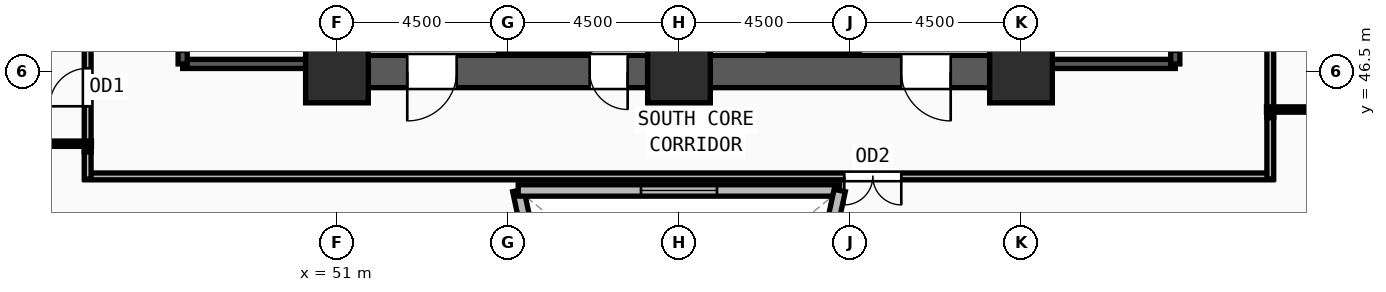
"""IFC4 building model, lengths in metres.
Left out: names, types, materials, properties, quantities, classifications, styles, units other than length and angle.
Written with IfcOpenShell. Run it as: python <this file> out.ifc"""

import sys

from ifc_helpers import new_model, si_unit, direction, frame, frame_2d, origin, origin_2d, place, context, subcontext, project, spatial, rectangle, extrude, source, transform, mapped, element, fill, save


model = new_model("IFC4")
c1 = context("Model", 3, precision=1e-05, world=origin(), true_north=direction((0.0, 1.0)))
c2 = subcontext(c1, "Body", "Model", "MODEL_VIEW")
j1 = project(units=[si_unit("LENGTHUNIT", "METRE"), si_unit("PLANEANGLEUNIT", "RADIAN")], contexts=[c1])
p1 = place(None, origin())
s1 = spatial("IfcSite", under=j1, at=p1, CompositionType="ELEMENT")
p2 = place(p1, origin())
s2 = spatial("IfcBuilding", under=s1, at=p2, CompositionType="ELEMENT")
p3 = place(p2, frame((0.0, 0.0, 85.5)))
s3 = spatial("IfcBuildingStorey", under=s2, at=p3, CompositionType="ELEMENT", Elevation=85.5)
m1 = source(origin(), c2, "Body", "SweptSolid", [
    extrude(rectangle(XDim=1.65, YDim=1.65, at=origin_2d()), origin(), (0.0, 0.0, 1.0), 3.75),
])
for number, where, z_axis, x_axis in (
    (1, (51.0, 46.5, 0.0), (0.0, 0.0, 1.0), (1.0, 0.0, 0.0)),
    (2, (60.0, 46.5, 0.0), (0.0, 0.0, 1.0), (1.0, 0.0, 0.0)),
    (3, (69.0, 46.5, 0.0), (0.0, 0.0, 1.0), (1.0, 0.0, 0.0)),
):
    element("IfcColumn", number, at=place(p3, frame(where, z_axis=z_axis, x_axis=x_axis)), inside=s3, PredefinedType="COLUMN", context=c2, shape_type="MappedRepresentation", body=[
        mapped(m1, transform((0.0, 0.0, 0.0), x_axis=(1.0, 0.0, 0.0), y_axis=(0.0, 1.0, 0.0), z_axis=(0.0, 0.0, 1.0), scale=1.0)),
    ])
p4 = place(p3, frame((68.175, 46.5, 0.0), z_axis=(0.0, 0.0, 1.0), x_axis=(-1.0, 0.0, 0.0)))
e4 = element("IfcWall", 4, at=p4, inside=s3, PredefinedType="SHEAR", context=c2, shape_type="SweptSolid", body=[
    extrude(rectangle(XDim=7.35, YDim=0.85, at=frame_2d((3.675, 0.0))), origin(), (0.0, 0.0, 1.0), 3.57),
])
m2 = source(origin(), c2, "Body", "SweptSolid", [
    extrude(rectangle(XDim=1.3, YDim=2.2, at=frame_2d((0.65, 1.1))), frame((0.0, 0.435, 0.0), z_axis=(0.0, -1.0, 0.0), x_axis=(1.0, 0.0, 0.0)), (0.0, 0.0, 1.0), 0.87),
])
p5 = place(p4, frame((1.025, 0.0, 0.0)))
e5 = element("IfcOpeningElement", 5, at=p5, cuts=e4, PredefinedType="OPENING", context=c2, shape_type="MappedRepresentation", body=[
    mapped(m2, transform((0.0, 0.0, 0.0), x_axis=(1.0, 0.0, 0.0), y_axis=(0.0, 1.0, 0.0), z_axis=(0.0, 0.0, 1.0), scale=1.0)),
])
p6 = place(p3, frame((59.175, 46.5, 0.0), z_axis=(0.0, 0.0, 1.0), x_axis=(-1.0, 0.0, 0.0)))
e6 = element("IfcWall", 6, at=p6, inside=s3, PredefinedType="SHEAR", context=c2, shape_type="SweptSolid", body=[
    extrude(rectangle(XDim=7.35, YDim=0.85, at=frame_2d((3.675, 0.0))), origin(), (0.0, 0.0, 1.0), 3.57),
])
p7 = place(p6, frame((5.025, 0.0, 0.0)))
e7 = element("IfcOpeningElement", 7, at=p7, cuts=e6, PredefinedType="OPENING", context=c2, shape_type="MappedRepresentation", body=[
    mapped(m2, transform((0.0, 0.0, 0.0), x_axis=(1.0, 0.0, 0.0), y_axis=(0.0, 1.0, 0.0), z_axis=(0.0, 0.0, 1.0), scale=1.0)),
])
m3 = source(origin(), c2, "Body", "SweptSolid", [
    extrude(rectangle(XDim=1.0, YDim=2.2, at=frame_2d((0.5, 1.1))), frame((0.0, 0.435, 0.0), z_axis=(0.0, -1.0, 0.0), x_axis=(1.0, 0.0, 0.0)), (0.0, 0.0, 1.0), 0.87),
])
p8 = place(p6, frame((0.525, 0.0, 0.0)))
e8 = element("IfcOpeningElement", 8, at=p8, cuts=e6, PredefinedType="OPENING", context=c2, shape_type="MappedRepresentation", body=[
    mapped(m3, transform((0.0, 0.0, 0.0), x_axis=(1.0, 0.0, 0.0), y_axis=(0.0, 1.0, 0.0), z_axis=(0.0, 0.0, 1.0), scale=1.0)),
])
p9 = place(p3, frame((46.94, 46.7, 0.0), z_axis=(0.0, 0.0, 1.0), x_axis=(1.0, 0.0, 0.0)))
e9 = element("IfcWall", 9, at=p9, inside=s3, PredefinedType="SOLIDWALL", context=c2, shape_type="SweptSolid", body=[
    extrude(rectangle(XDim=3.44, YDim=0.24, at=frame_2d((1.72, 0.0))), origin(), (0.0, 0.0, 1.0), 3.57),
])
p10 = place(p3, frame((50.38, 46.7, 0.0), z_axis=(0.0, 0.0, 1.0), x_axis=(0.0, 1.0, 0.0)))
e10 = element("IfcWall", 10, at=p10, inside=s3, PredefinedType="SOLIDWALL", context=c2, shape_type="SweptSolid", body=[
    extrude(rectangle(XDim=7.82, YDim=0.24, at=frame_2d((3.91, 0.0))), origin(), (0.0, 0.0, 1.0), 3.57),
])
p11 = place(p3, frame((46.94, 54.52, 0.0), z_axis=(0.0, 0.0, 1.0), x_axis=(0.0, -1.0, 0.0)))
e11 = element("IfcWall", 11, at=p11, inside=s3, PredefinedType="SOLIDWALL", context=c2, shape_type="SweptSolid", body=[
    extrude(rectangle(XDim=7.82, YDim=0.24, at=frame_2d((3.91, 0.0))), origin(), (0.0, 0.0, 1.0), 3.57),
])
m4 = source(origin(), c2, "Body", "SweptSolid", [
    extrude(rectangle(XDim=1.2, YDim=2.2, at=frame_2d((0.6, 1.1))), frame((0.0, 0.13, 0.0), z_axis=(0.0, -1.0, 0.0), x_axis=(1.0, 0.0, 0.0)), (0.0, 0.0, 1.0), 0.26),
])
p12 = place(p11, frame((6.3, 0.0, 0.0)))
e12 = element("IfcOpeningElement", 12, at=p12, cuts=e11, PredefinedType="OPENING", context=c2, shape_type="MappedRepresentation", body=[
    mapped(m4, transform((0.0, 0.0, 0.0), x_axis=(1.0, 0.0, 0.0), y_axis=(0.0, 1.0, 0.0), z_axis=(0.0, 0.0, 1.0), scale=1.0)),
])
p13 = place(p3, frame((69.62, 46.7, 0.0), z_axis=(0.0, 0.0, 1.0), x_axis=(1.0, 0.0, 0.0)))
e13 = element("IfcWall", 13, at=p13, inside=s3, PredefinedType="SOLIDWALL", context=c2, shape_type="SweptSolid", body=[
    extrude(rectangle(XDim=3.44, YDim=0.24, at=frame_2d((1.72, 0.0))), origin(), (0.0, 0.0, 1.0), 3.57),
])
p14 = place(p3, frame((73.06, 46.7, 0.0), z_axis=(0.0, 0.0, 1.0), x_axis=(0.0, 1.0, 0.0)))
e14 = element("IfcWall", 14, at=p14, inside=s3, PredefinedType="SOLIDWALL", context=c2, shape_type="SweptSolid", body=[
    extrude(rectangle(XDim=7.82, YDim=0.24, at=frame_2d((3.91, 0.0))), origin(), (0.0, 0.0, 1.0), 3.57),
])
p15 = place(p14, frame((0.32, 0.0, 0.0)))
e15 = element("IfcOpeningElement", 15, at=p15, cuts=e14, PredefinedType="OPENING", context=c2, shape_type="MappedRepresentation", body=[
    mapped(m4, transform((0.0, 0.0, 0.0), x_axis=(1.0, 0.0, 0.0), y_axis=(0.0, 1.0, 0.0), z_axis=(0.0, 0.0, 1.0), scale=1.0)),
])
p16 = place(p3, frame((69.62, 54.52, 0.0), z_axis=(0.0, 0.0, 1.0), x_axis=(0.0, -1.0, 0.0)))
e16 = element("IfcWall", 16, at=p16, inside=s3, PredefinedType="SOLIDWALL", context=c2, shape_type="SweptSolid", body=[
    extrude(rectangle(XDim=7.82, YDim=0.24, at=frame_2d((3.91, 0.0))), origin(), (0.0, 0.0, 1.0), 3.57),
])
p17 = place(p3, frame((57.251, 36.522, 0.0), z_axis=(0.0, 0.0, 1.0), x_axis=(-0.211370579765, 0.977405994462, 0.0)))
e17 = element("IfcWall", 17, at=p17, inside=s3, PredefinedType="SOLIDWALL", context=c2, shape_type="SweptSolid", body=[
    extrude(rectangle(XDim=7.006, YDim=0.3, at=frame_2d((3.503, 0.0))), origin(), (0.0, 0.0, 1.0), 3.57),
])
m5 = source(origin(), c2, "Body", "SweptSolid", [
    extrude(rectangle(XDim=2.0, YDim=1.9, at=frame_2d((1.0, 0.95))), frame((0.0, 0.16, 0.0), z_axis=(0.0, -1.0, 0.0), x_axis=(1.0, 0.0, 0.0)), (0.0, 0.0, 1.0), 0.32),
])
p18 = place(p17, frame((2.503, 0.0, 0.55)))
e18 = element("IfcOpeningElement", 18, at=p18, cuts=e17, PredefinedType="OPENING", context=c2, shape_type="MappedRepresentation", body=[
    mapped(m5, transform((0.0, 0.0, 0.0), x_axis=(1.0, 0.0, 0.0), y_axis=(0.0, 1.0, 0.0), z_axis=(0.0, 0.0, 1.0), scale=1.0)),
])
p19 = place(p3, frame((55.77, 43.37, 0.0), z_axis=(0.0, 0.0, 1.0), x_axis=(1.0, 0.0, 0.0)))
e19 = element("IfcWall", 19, at=p19, inside=s3, PredefinedType="SOLIDWALL", context=c2, shape_type="SweptSolid", body=[
    extrude(rectangle(XDim=8.46, YDim=0.3, at=frame_2d((4.23, 0.0))), origin(), (0.0, 0.0, 1.0), 3.57),
])
p20 = place(p19, frame((3.23, 0.0, 0.55)))
e20 = element("IfcOpeningElement", 20, at=p20, cuts=e19, PredefinedType="OPENING", context=c2, shape_type="MappedRepresentation", body=[
    mapped(m5, transform((0.0, 0.0, 0.0), x_axis=(1.0, 0.0, 0.0), y_axis=(0.0, 1.0, 0.0), z_axis=(0.0, 0.0, 1.0), scale=1.0)),
])
p21 = place(p3, frame((64.23, 43.37, 0.0), z_axis=(0.0, 0.0, 1.0), x_axis=(-0.211370579765, -0.977405994462, 0.0)))
e21 = element("IfcWall", 21, at=p21, inside=s3, PredefinedType="SOLIDWALL", context=c2, shape_type="SweptSolid", body=[
    extrude(rectangle(XDim=7.006, YDim=0.3, at=frame_2d((3.503, 0.0))), origin(), (0.0, 0.0, 1.0), 3.57),
])
p22 = place(p21, frame((2.503, 0.0, 0.55)))
e22 = element("IfcOpeningElement", 22, at=p22, cuts=e21, PredefinedType="OPENING", context=c2, shape_type="MappedRepresentation", body=[
    mapped(m5, transform((0.0, 0.0, 0.0), x_axis=(1.0, 0.0, 0.0), y_axis=(0.0, 1.0, 0.0), z_axis=(0.0, 0.0, 1.0), scale=1.0)),
])
p23 = place(p3, frame((44.44, 44.385, 0.0), z_axis=(0.0, 0.0, 1.0), x_axis=(0.0, 1.0, 0.0)))
e23 = element("IfcWall", 23, at=p23, inside=s3, PredefinedType="PARTITIONING", context=c2, shape_type="SweptSolid", body=[
    extrude(rectangle(XDim=3.4, YDim=0.18, at=frame_2d((1.7, 0.0))), origin(), (0.0, 0.0, 1.0), 3.57),
])
m6 = source(origin(), c2, "Body", "SweptSolid", [
    extrude(rectangle(XDim=1.0, YDim=2.2, at=frame_2d((0.5, 1.1))), frame((0.0, 0.1, 0.0), z_axis=(0.0, -1.0, 0.0), x_axis=(1.0, 0.0, 0.0)), (0.0, 0.0, 1.0), 0.2),
])
p24 = place(p23, frame((1.2, 0.0, 0.0)))
e24 = element("IfcOpeningElement", 24, at=p24, cuts=e23, PredefinedType="OPENING", context=c2, shape_type="MappedRepresentation", body=[
    mapped(m6, transform((0.0, 0.0, 0.0), x_axis=(1.0, 0.0, 0.0), y_axis=(0.0, 1.0, 0.0), z_axis=(0.0, 0.0, 1.0), scale=1.0)),
])
p25 = place(p3, frame((75.63, 43.74, 0.0), z_axis=(0.0, 0.0, 1.0), x_axis=(-1.0, 0.0, 0.0)))
e25 = element("IfcWall", 25, at=p25, inside=s3, PredefinedType="PARTITIONING", context=c2, shape_type="SweptSolid", body=[
    extrude(rectangle(XDim=31.26, YDim=0.18, at=frame_2d((15.63, 0.0))), origin(), (0.0, 0.0, 1.0), 3.57),
])
m7 = source(origin(), c2, "Body", "SweptSolid", [
    extrude(rectangle(XDim=1.5, YDim=2.2, at=frame_2d((0.75, 1.1))), frame((0.0, 0.1, 0.0), z_axis=(0.0, -1.0, 0.0), x_axis=(1.0, 0.0, 0.0)), (0.0, 0.0, 1.0), 0.2),
])
p26 = place(p25, frame((9.78, 0.0, 0.0)))
e26 = element("IfcOpeningElement", 26, at=p26, cuts=e25, PredefinedType="OPENING", context=c2, shape_type="MappedRepresentation", body=[
    mapped(m7, transform((0.0, 0.0, 0.0), x_axis=(1.0, 0.0, 0.0), y_axis=(0.0, 1.0, 0.0), z_axis=(0.0, 0.0, 1.0), scale=1.0)),
])
p27 = place(p3, frame((75.56, 51.285, 0.0), z_axis=(0.0, 0.0, 1.0), x_axis=(0.0, -1.0, 0.0)))
e27 = element("IfcWall", 27, at=p27, inside=s3, PredefinedType="PARTITIONING", context=c2, shape_type="SweptSolid", body=[
    extrude(rectangle(XDim=6.0, YDim=0.18, at=frame_2d((3.0, 0.0))), origin(), (0.0, 0.0, 1.0), 3.57),
])
p28 = place(p27, frame((2.5, 0.0, 0.0)))
e28 = element("IfcOpeningElement", 28, at=p28, cuts=e27, PredefinedType="OPENING", context=c2, shape_type="MappedRepresentation", body=[
    mapped(m6, transform((0.0, 0.0, 0.0), x_axis=(1.0, 0.0, 0.0), y_axis=(0.0, 1.0, 0.0), z_axis=(0.0, 0.0, 1.0), scale=1.0)),
])
p29 = place(p3, frame((75.56, 45.285, 0.0), z_axis=(0.0, 0.0, 1.0), x_axis=(0.0, -1.0, 0.0)))
e29 = element("IfcWall", 29, at=p29, inside=s3, PredefinedType="PARTITIONING", context=c2, shape_type="SweptSolid", body=[
    extrude(rectangle(XDim=1.615, YDim=0.18, at=frame_2d((0.808, 0.0))), origin(), (0.0, 0.0, 1.0), 3.57),
])
p30 = place(p3, frame((44.44, 43.67, 0.0), z_axis=(0.0, 0.0, 1.0), x_axis=(0.0, 1.0, 0.0)))
e30 = element("IfcWall", 30, at=p30, inside=s3, PredefinedType="PARTITIONING", context=c2, shape_type="SweptSolid", body=[
    extrude(rectangle(XDim=0.715, YDim=0.18, at=frame_2d((0.357, 0.0))), origin(), (0.0, 0.0, 1.0), 3.57),
])
p31 = place(p3, frame((44.54, 44.6, 0.0), z_axis=(0.0, 0.0, 1.0), x_axis=(-1.0, 0.0, 0.0)))
e31 = element("IfcWall", 31, at=p31, inside=s3, PredefinedType="PARTITIONING", context=c2, shape_type="SweptSolid", body=[
    extrude(rectangle(XDim=10.699, YDim=0.14, at=frame_2d((5.35, 0.0))), origin(), (0.0, 0.0, 1.0), 3.57),
])
p32 = place(p3, frame((75.46, 45.5, 0.0), z_axis=(0.0, 0.0, 1.0), x_axis=(1.0, 0.0, 0.0)))
e32 = element("IfcWall", 32, at=p32, inside=s3, PredefinedType="PARTITIONING", context=c2, shape_type="SweptSolid", body=[
    extrude(rectangle(XDim=11.479, YDim=0.14, at=frame_2d((5.74, 0.0))), origin(), (0.0, 0.0, 1.0), 3.57),
])
m8 = source(origin(), c2, "Body", "SweptSolid", [
    extrude(rectangle(XDim=1.3, YDim=2.2, at=frame_2d((0.65, 1.1))), frame((0.0, 0.025, 0.0), z_axis=(0.0, -1.0, 0.0), x_axis=(1.0, 0.0, 0.0)), (0.0, 0.0, 1.0), 0.05),
])
p33 = place(p7, origin())
e33 = element("IfcDoor", 33, at=p33, inside=s3, OperationType="SINGLE_SWING_RIGHT", PredefinedType="DOOR", context=c2, shape_type="MappedRepresentation", body=[
    mapped(m8, transform((0.0, 0.0, 0.0), x_axis=(1.0, 0.0, 0.0), y_axis=(0.0, 1.0, 0.0), z_axis=(0.0, 0.0, 1.0), scale=1.0)),
])
fill(e7, e33)
m9 = source(origin(), c2, "Body", "SweptSolid", [
    extrude(rectangle(XDim=1.0, YDim=2.2, at=frame_2d((0.5, 1.1))), frame((0.0, 0.025, 0.0), z_axis=(0.0, -1.0, 0.0), x_axis=(1.0, 0.0, 0.0)), (0.0, 0.0, 1.0), 0.05),
])
p34 = place(p8, origin())
e34 = element("IfcDoor", 34, at=p34, inside=s3, OperationType="SINGLE_SWING_LEFT", PredefinedType="DOOR", context=c2, shape_type="MappedRepresentation", body=[
    mapped(m9, transform((0.0, 0.0, 0.0), x_axis=(1.0, 0.0, 0.0), y_axis=(0.0, 1.0, 0.0), z_axis=(0.0, 0.0, 1.0), scale=1.0)),
])
fill(e8, e34)
p35 = place(p5, origin())
e35 = element("IfcDoor", 35, at=p35, inside=s3, OperationType="SINGLE_SWING_LEFT", PredefinedType="DOOR", context=c2, shape_type="MappedRepresentation", body=[
    mapped(m8, transform((0.0, 0.0, 0.0), x_axis=(1.0, 0.0, 0.0), y_axis=(0.0, 1.0, 0.0), z_axis=(0.0, 0.0, 1.0), scale=1.0)),
])
fill(e5, e35)
m10 = source(origin(), c2, "Body", "SweptSolid", [
    extrude(rectangle(XDim=2.0, YDim=1.9, at=frame_2d((1.0, 0.95))), frame((0.0, 0.03, 0.0), z_axis=(0.0, -1.0, 0.0), x_axis=(1.0, 0.0, 0.0)), (0.0, 0.0, 1.0), 0.06),
])
p36 = place(p20, origin())
e36 = element("IfcWindow", 36, at=p36, inside=s3, PartitioningType="DOUBLE_PANEL_VERTICAL", PredefinedType="WINDOW", context=c2, shape_type="MappedRepresentation", body=[
    mapped(m10, transform((0.0, 0.0, 0.0), x_axis=(1.0, 0.0, 0.0), y_axis=(0.0, 1.0, 0.0), z_axis=(0.0, 0.0, 1.0), scale=1.0)),
])
fill(e20, e36)
p37 = place(p24, origin())
e37 = element("IfcDoor", 37, at=p37, inside=s3, OperationType="SINGLE_SWING_LEFT", PredefinedType="DOOR", context=c2, shape_type="MappedRepresentation", body=[
    mapped(m9, transform((0.0, 0.0, 0.0), x_axis=(1.0, 0.0, 0.0), y_axis=(0.0, 1.0, 0.0), z_axis=(0.0, 0.0, 1.0), scale=1.0)),
])
fill(e24, e37)
m11 = source(origin(), c2, "Body", "SweptSolid", [
    extrude(rectangle(XDim=1.5, YDim=2.2, at=frame_2d((0.75, 1.1))), frame((0.0, 0.025, 0.0), z_axis=(0.0, -1.0, 0.0), x_axis=(1.0, 0.0, 0.0)), (0.0, 0.0, 1.0), 0.05),
])
p38 = place(p26, origin())
e38 = element("IfcDoor", 38, at=p38, inside=s3, OperationType="DOUBLE_DOOR_SINGLE_SWING", PredefinedType="DOOR", context=c2, shape_type="MappedRepresentation", body=[
    mapped(m11, transform((0.0, 0.0, 0.0), x_axis=(1.0, 0.0, 0.0), y_axis=(0.0, 1.0, 0.0), z_axis=(0.0, 0.0, 1.0), scale=1.0)),
])
fill(e26, e38)
save(model, sys.argv[1])
